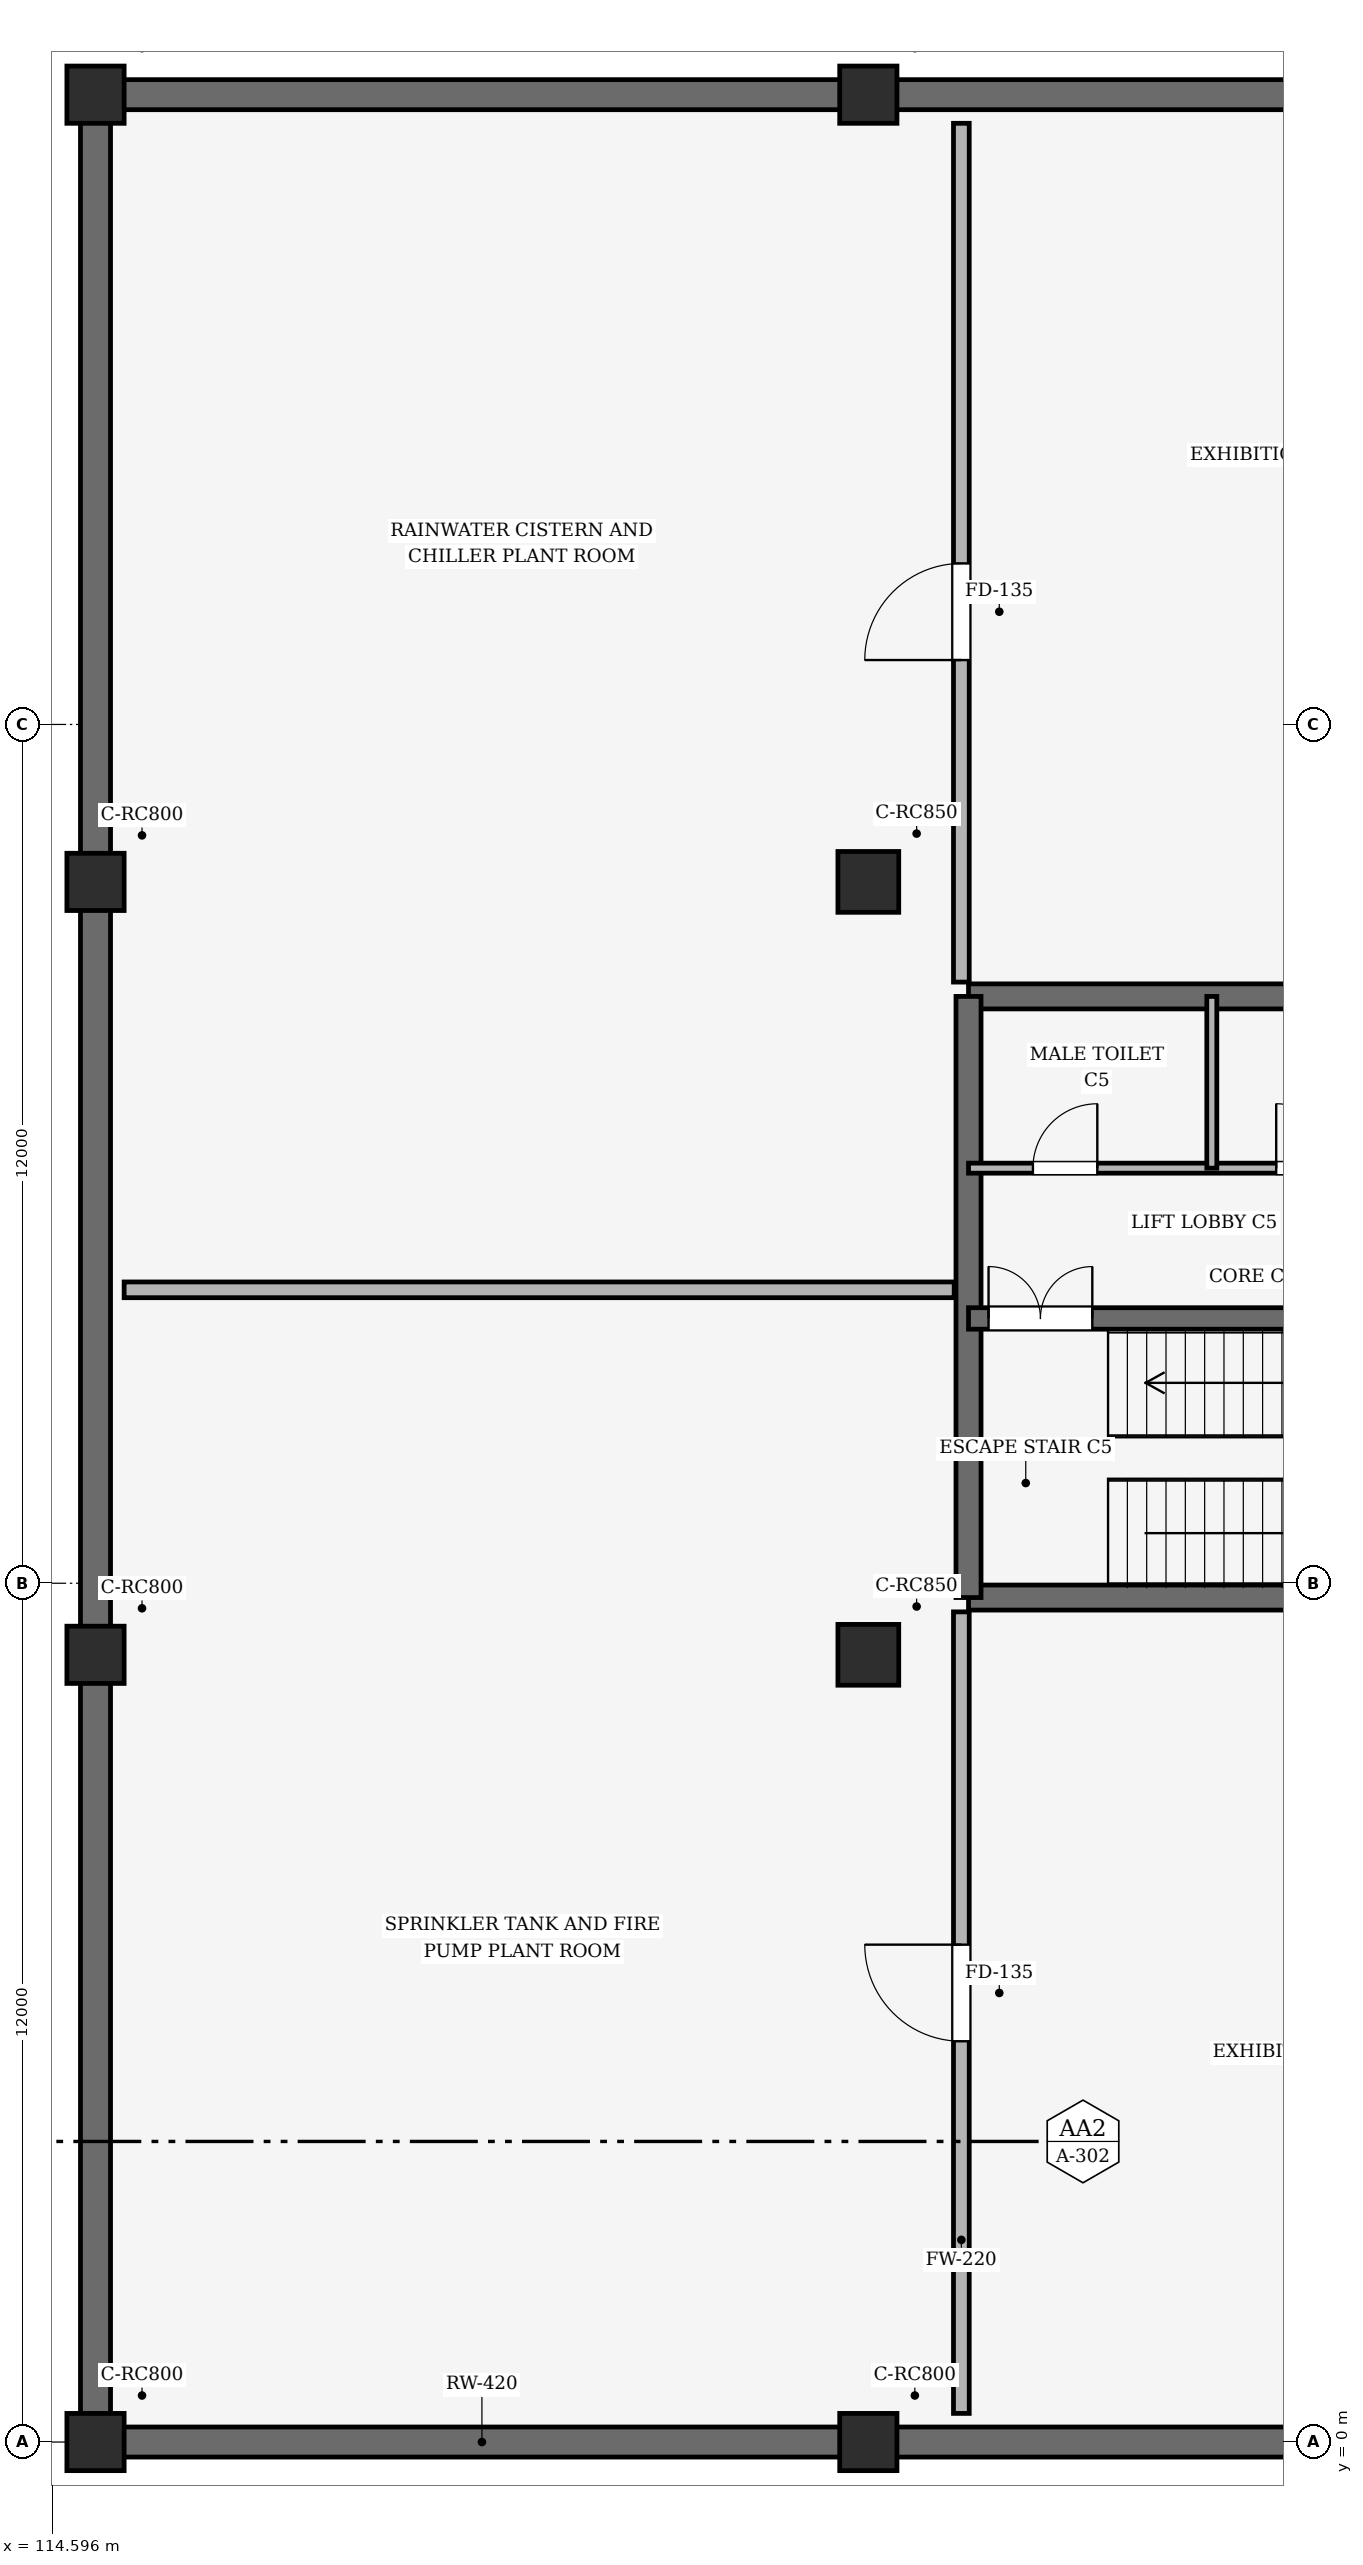
"""IFC4 building model, lengths in metres.
Left out: names, types, materials, properties, quantities, classifications, styles, units other than length and angle.
Written with IfcOpenShell. Run it as: python <this file> out.ifc"""

import sys

from ifc_helpers import new_model, si_unit, direction, frame, frame_2d, origin, origin_2d, place, context, subcontext, project, spatial, rectangle, extrude, element, fill, save


model = new_model("IFC4")
c1 = context("Model", 3, precision=1e-05, world=origin(), true_north=direction((0.0, 1.0)))
c2 = subcontext(c1, "Body", "Model", "MODEL_VIEW")
j1 = project(units=[si_unit("LENGTHUNIT", "METRE"), si_unit("PLANEANGLEUNIT", "RADIAN")], contexts=[c1])
p1 = place(None, origin())
s1 = spatial("IfcSite", under=j1, at=p1, CompositionType="ELEMENT")
p2 = place(p1, origin())
s2 = spatial("IfcBuilding", under=s1, at=p2, CompositionType="ELEMENT")
p3 = place(p2, frame((0.0, 0.0, -4.8)))
s3 = spatial("IfcBuildingStorey", under=s2, at=p3, CompositionType="ELEMENT", Elevation=-4.8)
for number, where, z_axis, x_axis in (
    (1, (115.2, 0.0, -0.45), (0.0, 0.0, 1.0), (1.0, 0.0, 0.0)),
    (2, (115.2, 11.0, -0.45), (0.0, 0.0, 1.0), (1.0, 0.0, 0.0)),
    (3, (115.2, 21.8, -0.45), (0.0, 0.0, 1.0), (1.0, 0.0, 0.0)),
    (4, (115.2, 32.8, -0.45), (0.0, 0.0, 1.0), (1.0, 0.0, 0.0)),
    (5, (126.0, 0.0, -0.45), (0.0, 0.0, 1.0), (1.0, 0.0, 0.0)),
):
    element("IfcColumn", number, at=place(p3, frame(where, z_axis=z_axis, x_axis=x_axis)), inside=s3, PredefinedType="COLUMN", context=c2, shape_type="SweptSolid", body=[
        extrude(rectangle(XDim=0.8, YDim=0.8, at=origin_2d()), origin(), (0.0, 0.0, 1.0), 5.25),
    ])
for number, where, z_axis, x_axis in (
    (6, (126.0, 11.0, -0.45), (0.0, 0.0, 1.0), (1.0, 0.0, 0.0)),
    (7, (126.0, 21.8, -0.45), (0.0, 0.0, 1.0), (1.0, 0.0, 0.0)),
):
    element("IfcColumn", number, at=place(p3, frame(where, z_axis=z_axis, x_axis=x_axis)), inside=s3, PredefinedType="COLUMN", context=c2, shape_type="SweptSolid", body=[
        extrude(rectangle(XDim=0.85, YDim=0.85, at=origin_2d()), origin(), (0.0, 0.0, 1.0), 5.25),
    ])
p4 = place(p3, frame((126.0, 32.8, -0.45), z_axis=(0.0, 0.0, 1.0), x_axis=(1.0, 0.0, 0.0)))
e8 = element("IfcColumn", 8, at=p4, inside=s3, PredefinedType="COLUMN", context=c2, shape_type="SweptSolid", body=[
    extrude(rectangle(XDim=0.8, YDim=0.8, at=origin_2d()), origin(), (0.0, 0.0, 1.0), 5.25),
])
for number, where, z_axis, x_axis in (
    (9, (115.2, 0.0, 0.0), (0.0, 0.0, 1.0), (1.0, 0.0, 0.0)),
    (10, (126.0, 32.8, 0.0), (0.0, 0.0, 1.0), (-1.0, 0.0, 0.0)),
):
    element("IfcWall", number, at=place(p3, frame(where, z_axis=z_axis, x_axis=x_axis)), inside=s3, PredefinedType="STANDARD", context=c2, shape_type="SweptSolid", body=[
        extrude(rectangle(XDim=10.8, YDim=0.42, at=frame_2d((5.4, 0.0))), origin(), (0.0, 0.0, 1.0), 4.54),
    ])
for number, where, z_axis, x_axis in (
    (11, (126.0, 0.0, 0.0), (0.0, 0.0, 1.0), (1.0, 0.0, 0.0)),
    (12, (138.0, 32.8, 0.0), (0.0, 0.0, 1.0), (-1.0, 0.0, 0.0)),
):
    element("IfcWall", number, at=place(p3, frame(where, z_axis=z_axis, x_axis=x_axis)), inside=s3, PredefinedType="STANDARD", context=c2, shape_type="SweptSolid", body=[
        extrude(rectangle(XDim=12.0, YDim=0.42, at=frame_2d((6.0, 0.0))), origin(), (0.0, 0.0, 1.0), 4.54),
    ])
p5 = place(p3, frame((115.2, 11.0, 0.0), z_axis=(0.0, 0.0, 1.0), x_axis=(0.0, -1.0, 0.0)))
e13 = element("IfcWall", 13, at=p5, inside=s3, PredefinedType="STANDARD", context=c2, shape_type="SweptSolid", body=[
    extrude(rectangle(XDim=11.0, YDim=0.42, at=frame_2d((5.5, 0.0))), origin(), (0.0, 0.0, 1.0), 4.54),
])
p6 = place(p3, frame((115.2, 21.8, 0.0), z_axis=(0.0, 0.0, 1.0), x_axis=(0.0, -1.0, 0.0)))
e14 = element("IfcWall", 14, at=p6, inside=s3, PredefinedType="STANDARD", context=c2, shape_type="SweptSolid", body=[
    extrude(rectangle(XDim=10.8, YDim=0.42, at=frame_2d((5.4, 0.0))), origin(), (0.0, 0.0, 1.0), 4.54),
])
p7 = place(p3, frame((115.2, 32.8, 0.0), z_axis=(0.0, 0.0, 1.0), x_axis=(0.0, -1.0, 0.0)))
e15 = element("IfcWall", 15, at=p7, inside=s3, PredefinedType="STANDARD", context=c2, shape_type="SweptSolid", body=[
    extrude(rectangle(XDim=11.0, YDim=0.42, at=frame_2d((5.5, 0.0))), origin(), (0.0, 0.0, 1.0), 4.54),
])
for number, where, z_axis, x_axis in (
    (16, (127.4, 11.8, 0.0), (0.0, 0.0, 1.0), (1.0, 0.0, 0.0)),
    (17, (137.6, 20.2, 0.0), (0.0, 0.0, 1.0), (-1.0, 0.0, 0.0)),
):
    element("IfcWall", number, at=place(p3, frame(where, z_axis=z_axis, x_axis=x_axis)), inside=s3, PredefinedType="SHEAR", context=c2, shape_type="SweptSolid", body=[
        extrude(rectangle(XDim=10.2, YDim=0.35, at=frame_2d((5.1, 0.0))), origin(), (0.0, 0.0, 1.0), 4.8),
    ])
p8 = place(p3, frame((127.4, 20.2, 0.0), z_axis=(0.0, 0.0, 1.0), x_axis=(0.0, -1.0, 0.0)))
e18 = element("IfcWall", 18, at=p8, inside=s3, PredefinedType="SHEAR", context=c2, shape_type="SweptSolid", body=[
    extrude(rectangle(XDim=8.4, YDim=0.35, at=frame_2d((4.2, 0.0))), origin(), (0.0, 0.0, 1.0), 4.8),
])
p9 = place(p3, frame((127.4, 15.7, 0.0), z_axis=(0.0, 0.0, 1.0), x_axis=(1.0, 0.0, 0.0)))
e19 = element("IfcWall", 19, at=p9, inside=s3, PredefinedType="SHEAR", context=c2, shape_type="SweptSolid", body=[
    extrude(rectangle(XDim=10.2, YDim=0.3, at=frame_2d((5.1, 0.0))), origin(), (0.0, 0.0, 1.0), 4.8),
])
p10 = place(p9, frame((0.28, 0.0, 0.0)))
e20 = element("IfcOpeningElement", 20, at=p10, cuts=e19, PredefinedType="OPENING", context=c2, shape_type="SweptSolid", body=[
    extrude(rectangle(XDim=1.45, YDim=2.15, at=frame_2d((0.725, 1.075))), frame((0.0, 0.16, 0.0), z_axis=(0.0, -1.0, 0.0), x_axis=(1.0, 0.0, 0.0)), (0.0, 0.0, 1.0), 0.32),
])
p11 = place(p9, frame((8.225, 0.0, 0.0)))
e21 = element("IfcOpeningElement", 21, at=p11, cuts=e19, PredefinedType="OPENING", context=c2, shape_type="SweptSolid", body=[
    extrude(rectangle(XDim=1.1, YDim=2.15, at=frame_2d((0.55, 1.075))), frame((0.0, 0.16, 0.0), z_axis=(0.0, -1.0, 0.0), x_axis=(1.0, 0.0, 0.0)), (0.0, 0.0, 1.0), 0.32),
])
p12 = place(p3, frame((127.4, 17.8, 0.0), z_axis=(0.0, 0.0, 1.0), x_axis=(1.0, 0.0, 0.0)))
e22 = element("IfcWall", 22, at=p12, inside=s3, PredefinedType="PARTITIONING", context=c2, shape_type="SweptSolid", body=[
    extrude(rectangle(XDim=10.2, YDim=0.14, at=frame_2d((5.1, 0.0))), origin(), (0.0, 0.0, 1.0), 3.9),
])
p13 = place(p12, frame((0.9, 0.0, 0.0)))
e23 = element("IfcOpeningElement", 23, at=p13, cuts=e22, PredefinedType="OPENING", context=c2, shape_type="SweptSolid", body=[
    extrude(rectangle(XDim=0.9, YDim=2.1, at=frame_2d((0.45, 1.05))), frame((0.0, 0.08, 0.0), z_axis=(0.0, -1.0, 0.0), x_axis=(1.0, 0.0, 0.0)), (0.0, 0.0, 1.0), 0.16),
])
p14 = place(p12, frame((4.3, 0.0, 0.0)))
e24 = element("IfcOpeningElement", 24, at=p14, cuts=e22, PredefinedType="OPENING", context=c2, shape_type="SweptSolid", body=[
    extrude(rectangle(XDim=0.9, YDim=2.1, at=frame_2d((0.45, 1.05))), frame((0.0, 0.08, 0.0), z_axis=(0.0, -1.0, 0.0), x_axis=(1.0, 0.0, 0.0)), (0.0, 0.0, 1.0), 0.16),
])
p15 = place(p12, frame((7.7, 0.0, 0.0)))
e25 = element("IfcOpeningElement", 25, at=p15, cuts=e22, PredefinedType="OPENING", context=c2, shape_type="SweptSolid", body=[
    extrude(rectangle(XDim=0.95, YDim=2.1, at=frame_2d((0.475, 1.05))), frame((0.0, 0.08, 0.0), z_axis=(0.0, -1.0, 0.0), x_axis=(1.0, 0.0, 0.0)), (0.0, 0.0, 1.0), 0.16),
])
p16 = place(p3, frame((130.8, 17.8, 0.0), z_axis=(0.0, 0.0, 1.0), x_axis=(0.0, 1.0, 0.0)))
e26 = element("IfcWall", 26, at=p16, inside=s3, PredefinedType="PARTITIONING", context=c2, shape_type="SweptSolid", body=[
    extrude(rectangle(XDim=2.4, YDim=0.14, at=frame_2d((1.2, 0.0))), origin(), (0.0, 0.0, 1.0), 3.9),
])
p17 = place(p3, frame((127.3, 0.4, 0.0), z_axis=(0.0, 0.0, 1.0), x_axis=(0.0, 1.0, 0.0)))
e27 = element("IfcWall", 27, at=p17, inside=s3, PredefinedType="SOLIDWALL", context=c2, shape_type="SweptSolid", body=[
    extrude(rectangle(XDim=11.2, YDim=0.22, at=frame_2d((5.6, 0.0))), origin(), (0.0, 0.0, 1.0), 3.6),
])
p18 = place(p17, frame((5.2, 0.0, 0.0)))
e28 = element("IfcOpeningElement", 28, at=p18, cuts=e27, PredefinedType="OPENING", context=c2, shape_type="SweptSolid", body=[
    extrude(rectangle(XDim=1.35, YDim=2.2, at=frame_2d((0.675, 1.1))), frame((0.0, 0.12, 0.0), z_axis=(0.0, -1.0, 0.0), x_axis=(1.0, 0.0, 0.0)), (0.0, 0.0, 1.0), 0.24),
])
p19 = place(p3, frame((127.3, 20.4, 0.0), z_axis=(0.0, 0.0, 1.0), x_axis=(0.0, 1.0, 0.0)))
e29 = element("IfcWall", 29, at=p19, inside=s3, PredefinedType="SOLIDWALL", context=c2, shape_type="SweptSolid", body=[
    extrude(rectangle(XDim=12.0, YDim=0.22, at=frame_2d((6.0, 0.0))), origin(), (0.0, 0.0, 1.0), 3.6),
])
p20 = place(p19, frame((4.5, 0.0, 0.0)))
e30 = element("IfcOpeningElement", 30, at=p20, cuts=e29, PredefinedType="OPENING", context=c2, shape_type="SweptSolid", body=[
    extrude(rectangle(XDim=1.35, YDim=2.2, at=frame_2d((0.675, 1.1))), frame((0.0, 0.12, 0.0), z_axis=(0.0, -1.0, 0.0), x_axis=(1.0, 0.0, 0.0)), (0.0, 0.0, 1.0), 0.24),
])
p21 = place(p3, frame((115.6, 16.1, 0.0), z_axis=(0.0, 0.0, 1.0), x_axis=(1.0, 0.0, 0.0)))
e31 = element("IfcWall", 31, at=p21, inside=s3, PredefinedType="SOLIDWALL", context=c2, shape_type="SweptSolid", body=[
    extrude(rectangle(XDim=11.6, YDim=0.22, at=frame_2d((5.8, 0.0))), origin(), (0.0, 0.0, 1.0), 3.6),
])
p22 = place(p10, origin())
e32 = element("IfcDoor", 32, at=p22, inside=s3, OperationType="DOUBLE_DOOR_SINGLE_SWING", PredefinedType="DOOR", context=c2, shape_type="SweptSolid", body=[
    extrude(rectangle(XDim=1.45, YDim=2.15, at=frame_2d((0.725, 1.075))), frame((0.0, 0.025, 0.0), z_axis=(0.0, -1.0, 0.0), x_axis=(1.0, 0.0, 0.0)), (0.0, 0.0, 1.0), 0.05),
])
fill(e20, e32)
p23 = place(p13, origin())
e33 = element("IfcDoor", 33, at=p23, inside=s3, OperationType="SINGLE_SWING_RIGHT", PredefinedType="DOOR", context=c2, shape_type="SweptSolid", body=[
    extrude(rectangle(XDim=0.9, YDim=2.1, at=frame_2d((0.45, 1.05))), frame((0.0, 0.025, 0.0), z_axis=(0.0, -1.0, 0.0), x_axis=(1.0, 0.0, 0.0)), (0.0, 0.0, 1.0), 0.05),
])
fill(e23, e33)
p24 = place(p14, origin())
e34 = element("IfcDoor", 34, at=p24, inside=s3, OperationType="SINGLE_SWING_LEFT", PredefinedType="DOOR", context=c2, shape_type="SweptSolid", body=[
    extrude(rectangle(XDim=0.9, YDim=2.1, at=frame_2d((0.45, 1.05))), frame((0.0, 0.025, 0.0), z_axis=(0.0, -1.0, 0.0), x_axis=(1.0, 0.0, 0.0)), (0.0, 0.0, 1.0), 0.05),
])
fill(e24, e34)
p25 = place(p18, origin())
e35 = element("IfcDoor", 35, at=p25, inside=s3, OperationType="SINGLE_SWING_RIGHT", PredefinedType="DOOR", context=c2, shape_type="SweptSolid", body=[
    extrude(rectangle(XDim=1.35, YDim=2.2, at=frame_2d((0.675, 1.1))), frame((0.0, 0.025, 0.0), z_axis=(0.0, -1.0, 0.0), x_axis=(1.0, 0.0, 0.0)), (0.0, 0.0, 1.0), 0.05),
])
fill(e28, e35)
p26 = place(p20, origin())
e36 = element("IfcDoor", 36, at=p26, inside=s3, OperationType="SINGLE_SWING_LEFT", PredefinedType="DOOR", context=c2, shape_type="SweptSolid", body=[
    extrude(rectangle(XDim=1.35, YDim=2.2, at=frame_2d((0.675, 1.1))), frame((0.0, 0.025, 0.0), z_axis=(0.0, -1.0, 0.0), x_axis=(1.0, 0.0, 0.0)), (0.0, 0.0, 1.0), 0.05),
])
fill(e30, e36)
save(model, sys.argv[1])
